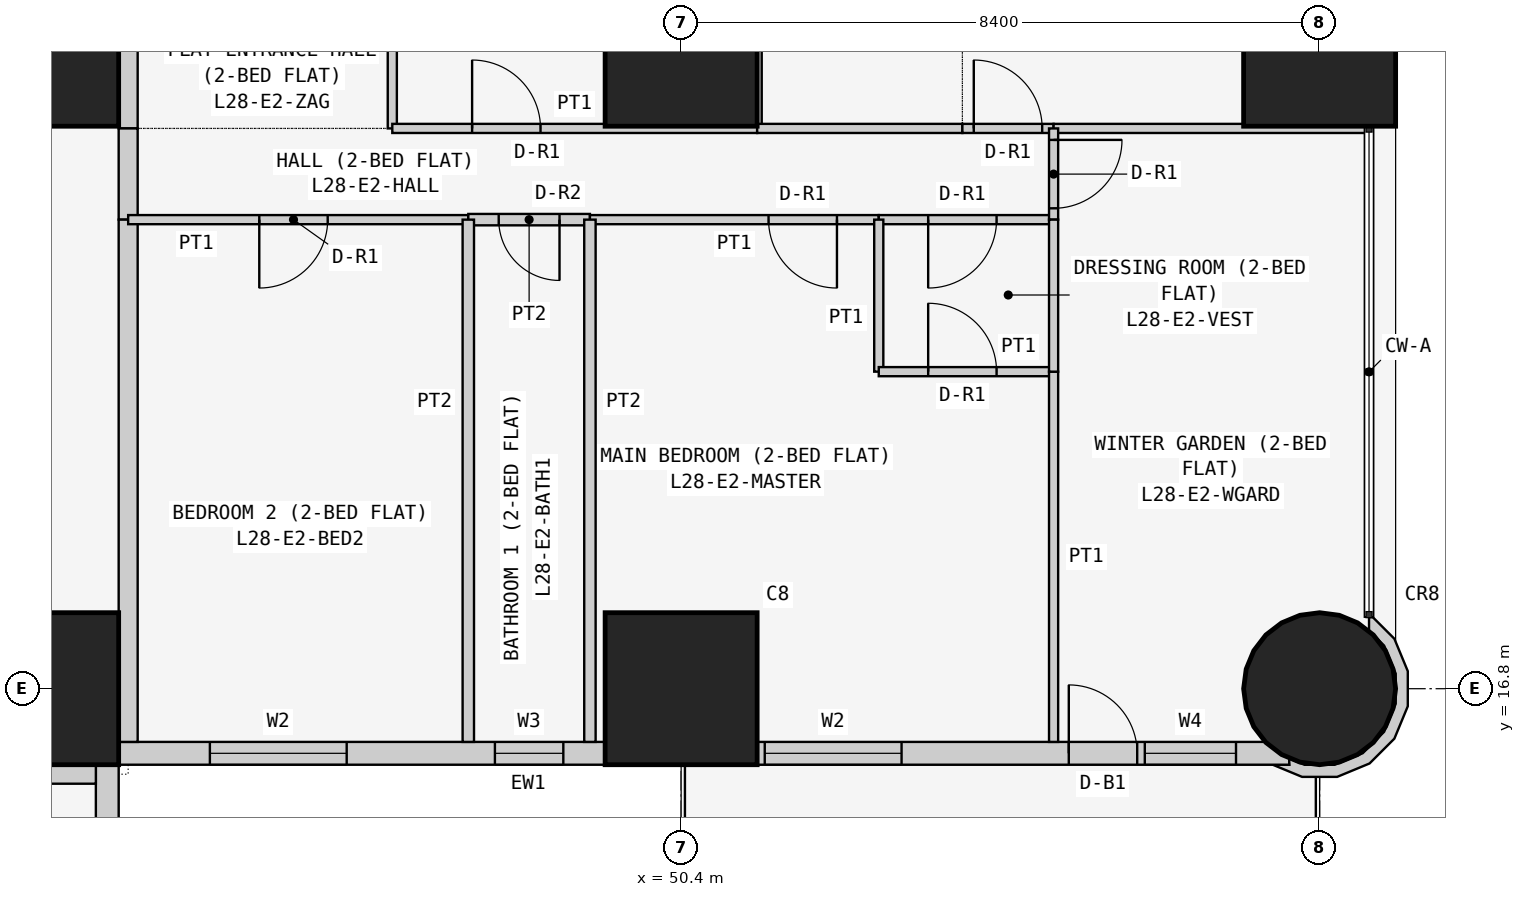
"""IFC4 building model, lengths in metres.
Left out: names, types, materials, properties, quantities, classifications, styles, units other than length and angle.
Written with IfcOpenShell. Run it as: python <this file> out.ifc"""

import sys

from ifc_helpers import new_model, si_unit, direction, frame, frame_2d, origin, origin_2d, place, context, subcontext, project, spatial, polyline, rectangle, circle, outline, extrude, element, fill, save


model = new_model("IFC4")
c1 = context("Model", 3, precision=1e-05, world=origin(), true_north=direction((0.0, 1.0)))
c2 = subcontext(c1, "Body", "Model", "MODEL_VIEW")
j1 = project(units=[si_unit("LENGTHUNIT", "METRE"), si_unit("PLANEANGLEUNIT", "RADIAN")], contexts=[c1])
p1 = place(None, origin())
s1 = spatial("IfcSite", under=j1, at=p1, CompositionType="ELEMENT")
p2 = place(p1, origin())
s2 = spatial("IfcBuilding", under=s1, at=p2, CompositionType="ELEMENT")
p3 = place(p2, frame((0.0, 0.0, 112.5)))
s3 = spatial("IfcBuildingStorey", under=s2, at=p3, CompositionType="ELEMENT", Elevation=112.5)
for number, where, z_axis, x_axis in (
    (1, (42.0, 16.8, 0.0), (0.0, 0.0, 1.0), (1.0, 0.0, 0.0)),
    (2, (42.0, 25.2, 0.0), (0.0, 0.0, 1.0), (1.0, 0.0, 0.0)),
    (3, (50.4, 16.8, 0.0), (0.0, 0.0, 1.0), (1.0, 0.0, 0.0)),
    (4, (50.4, 25.2, 0.0), (0.0, 0.0, 1.0), (1.0, 0.0, 0.0)),
):
    element("IfcColumn", number, at=place(p3, frame(where, z_axis=z_axis, x_axis=x_axis)), inside=s3, PredefinedType="COLUMN", context=c2, shape_type="SweptSolid", body=[
        extrude(rectangle(XDim=2.0, YDim=2.0, at=origin_2d()), origin(), (0.0, 0.0, 1.0), 3.6),
    ])
p4 = place(p3, frame((58.8, 16.8, 0.0), z_axis=(0.0, 0.0, 1.0), x_axis=(1.0, 0.0, 0.0)))
e5 = element("IfcColumn", 5, at=p4, inside=s3, PredefinedType="COLUMN", context=c2, shape_type="SweptSolid", body=[
    extrude(circle(Radius=1.0, at=origin_2d()), origin(), (0.0, 0.0, 1.0), 3.6),
])
p5 = place(p3, frame((58.8, 25.2, 0.0), z_axis=(0.0, 0.0, 1.0), x_axis=(1.0, 0.0, 0.0)))
e6 = element("IfcColumn", 6, at=p5, inside=s3, PredefinedType="COLUMN", context=c2, shape_type="SweptSolid", body=[
    extrude(rectangle(XDim=2.0, YDim=2.0, at=origin_2d()), origin(), (0.0, 0.0, 1.0), 3.6),
])
p6 = place(p3, frame((42.85, 8.8, 0.0), z_axis=(0.0, 0.0, 1.0), x_axis=(0.0, 1.0, 0.0)))
e7 = element("IfcWall", 7, at=p6, inside=s3, PredefinedType="SOLIDWALL", context=c2, shape_type="SweptSolid", body=[
    extrude(rectangle(XDim=7.3, YDim=0.3, at=frame_2d((3.65, 0.0))), origin(), (0.0, 0.0, 1.0), 3.45),
])
p7 = place(p6, frame((3.1, 0.0, 0.9)))
e8 = element("IfcOpeningElement", 8, at=p7, cuts=e7, PredefinedType="OPENING", context=c2, shape_type="SweptSolid", body=[
    extrude(rectangle(XDim=2.4, YDim=1.5, at=frame_2d((1.2, 0.75))), frame((0.0, 0.16, 0.0), z_axis=(0.0, -1.0, 0.0), x_axis=(1.0, 0.0, 0.0)), (0.0, 0.0, 1.0), 0.32),
])
p8 = place(p6, frame((0.75, 0.0, 0.9)))
e9 = element("IfcOpeningElement", 9, at=p8, cuts=e7, PredefinedType="OPENING", context=c2, shape_type="SweptSolid", body=[
    extrude(rectangle(XDim=1.2, YDim=1.5, at=frame_2d((0.6, 0.75))), frame((0.0, 0.16, 0.0), z_axis=(0.0, -1.0, 0.0), x_axis=(1.0, 0.0, 0.0)), (0.0, 0.0, 1.0), 0.32),
])
p9 = place(p3, frame((43.0, 15.95, 0.0), z_axis=(0.0, 0.0, 1.0), x_axis=(1.0, 0.0, 0.0)))
e10 = element("IfcWall", 10, at=p9, inside=s3, PredefinedType="SOLIDWALL", context=c2, shape_type="SweptSolid", body=[
    extrude(rectangle(XDim=15.4, YDim=0.3, at=frame_2d((7.7, 0.0))), origin(), (0.0, 0.0, 1.0), 3.45),
])
p10 = place(p9, frame((1.2, 0.0, 0.9)))
e11 = element("IfcOpeningElement", 11, at=p10, cuts=e10, PredefinedType="OPENING", context=c2, shape_type="SweptSolid", body=[
    extrude(rectangle(XDim=1.8, YDim=1.5, at=frame_2d((0.9, 0.75))), frame((0.0, 0.16, 0.0), z_axis=(0.0, -1.0, 0.0), x_axis=(1.0, 0.0, 0.0)), (0.0, 0.0, 1.0), 0.32),
])
p11 = place(p9, frame((4.95, 0.0, 1.5)))
e12 = element("IfcOpeningElement", 12, at=p11, cuts=e10, PredefinedType="OPENING", context=c2, shape_type="SweptSolid", body=[
    extrude(rectangle(XDim=0.9, YDim=0.7, at=frame_2d((0.45, 0.35))), frame((0.0, 0.16, 0.0), z_axis=(0.0, -1.0, 0.0), x_axis=(1.0, 0.0, 0.0)), (0.0, 0.0, 1.0), 0.32),
])
p12 = place(p9, frame((8.5, 0.0, 0.9)))
e13 = element("IfcOpeningElement", 13, at=p12, cuts=e10, PredefinedType="OPENING", context=c2, shape_type="SweptSolid", body=[
    extrude(rectangle(XDim=1.8, YDim=1.5, at=frame_2d((0.9, 0.75))), frame((0.0, 0.16, 0.0), z_axis=(0.0, -1.0, 0.0), x_axis=(1.0, 0.0, 0.0)), (0.0, 0.0, 1.0), 0.32),
])
p13 = place(p9, frame((12.5, 0.0, 0.0)))
e14 = element("IfcOpeningElement", 14, at=p13, cuts=e10, PredefinedType="OPENING", context=c2, shape_type="SweptSolid", body=[
    extrude(rectangle(XDim=0.9, YDim=2.4, at=frame_2d((0.45, 1.2))), frame((0.0, 0.16, 0.0), z_axis=(0.0, -1.0, 0.0), x_axis=(1.0, 0.0, 0.0)), (0.0, 0.0, 1.0), 0.32),
])
p14 = place(p9, frame((13.5, 0.0, 0.9)))
e15 = element("IfcOpeningElement", 15, at=p14, cuts=e10, PredefinedType="OPENING", context=c2, shape_type="SweptSolid", body=[
    extrude(rectangle(XDim=1.2, YDim=1.5, at=frame_2d((0.6, 0.75))), frame((0.0, 0.16, 0.0), z_axis=(0.0, -1.0, 0.0), x_axis=(1.0, 0.0, 0.0)), (0.0, 0.0, 1.0), 0.32),
])
p15 = place(p3, frame((58.233, 15.881, 0.0), z_axis=(0.0, 0.0, 1.0), x_axis=(0.831199417842, -0.555974394895, 0.0)))
e16 = element("IfcWall", 16, at=p15, inside=s3, PredefinedType="SOLIDWALL", context=c2, shape_type="SweptSolid", body=[
    extrude(outline(polyline([(0.075, 2.077), (0.351, 2.022), (0.682, 1.801), (0.903, 1.47), (0.981, 1.08), (0.903, 0.689), (0.682, 0.358), (0.351, 0.137), (0.126, 0.092), (0.184, 0.026), (0.004, -0.095), (0.414, -0.013), (0.797, 0.243), (1.053, 0.627), (1.143, 1.08), (1.053, 1.532), (0.796, 1.916), (0.413, 2.172), (0.017, 2.251), (-0.023, 2.224), (0.075, 2.077)])), origin(), (0.0, 0.0, 1.0), 3.45),
])
p16 = place(p3, frame((43.125, 29.4, 0.0), z_axis=(0.0, 0.0, 1.0), x_axis=(0.0, -1.0, 0.0)))
e17 = element("IfcWall", 17, at=p16, inside=s3, PredefinedType="PARTITIONING", context=c2, shape_type="SweptSolid", body=[
    extrude(rectangle(XDim=5.229, YDim=0.25, at=frame_2d((2.615, 0.0))), origin(), (0.0, 0.0, 1.0), 3.45),
])
p17 = place(p16, frame((2.05, 0.0, 0.0)))
e18 = element("IfcOpeningElement", 18, at=p17, cuts=e17, PredefinedType="OPENING", context=c2, shape_type="SweptSolid", body=[
    extrude(rectangle(XDim=1.0, YDim=2.1, at=frame_2d((0.5, 1.05))), frame((0.0, 0.135, 0.0), z_axis=(0.0, -1.0, 0.0), x_axis=(1.0, 0.0, 0.0)), (0.0, 0.0, 1.0), 0.27),
])
p18 = place(p3, frame((43.125, 24.171, 0.0), z_axis=(0.0, 0.0, 1.0), x_axis=(0.0, -1.0, 0.0)))
e19 = element("IfcWall", 19, at=p18, inside=s3, PredefinedType="PARTITIONING", context=c2, shape_type="SweptSolid", body=[
    extrude(rectangle(XDim=1.2, YDim=0.25, at=frame_2d((0.6, 0.0))), origin(), (0.0, 0.0, 1.0), 3.45),
])
p19 = place(p3, frame((43.125, 22.971, 0.0), z_axis=(0.0, 0.0, 1.0), x_axis=(0.0, -1.0, 0.0)))
e20 = element("IfcWall", 20, at=p19, inside=s3, PredefinedType="PARTITIONING", context=c2, shape_type="SweptSolid", body=[
    extrude(rectangle(XDim=6.871, YDim=0.25, at=frame_2d((3.436, 0.0))), origin(), (0.0, 0.0, 1.0), 3.45),
])
p20 = place(p3, frame((42.7, 15.675, 0.0), z_axis=(0.0, 0.0, 1.0), x_axis=(-1.0, 0.0, 0.0)))
e21 = element("IfcWall", 21, at=p20, inside=s3, PredefinedType="PARTITIONING", context=c2, shape_type="SweptSolid", body=[
    extrude(rectangle(XDim=6.471, YDim=0.25, at=frame_2d((3.235, 0.0))), origin(), (0.0, 0.0, 1.0), 3.45),
])
for number, where, z_axis, x_axis in (
    (22, (46.6, 29.4, 0.0), (0.0, 0.0, 1.0), (0.0, -1.0, 0.0)),
    (23, (51.4, 29.4, 0.0), (0.0, 0.0, 1.0), (0.0, -1.0, 0.0)),
):
    element("IfcWall", number, at=place(p3, frame(where, z_axis=z_axis, x_axis=x_axis)), inside=s3, PredefinedType="PARTITIONING", context=c2, shape_type="SweptSolid", body=[
        extrude(rectangle(XDim=5.229, YDim=0.12, at=frame_2d((2.615, 0.0))), origin(), (0.0, 0.0, 1.0), 3.45),
    ])
p21 = place(p3, frame((51.4, 24.171, 0.0), z_axis=(0.0, 0.0, 1.0), x_axis=(-1.0, 0.0, 0.0)))
e24 = element("IfcWall", 24, at=p21, inside=s3, PredefinedType="PARTITIONING", context=c2, shape_type="SweptSolid", body=[
    extrude(rectangle(XDim=4.8, YDim=0.12, at=frame_2d((2.4, 0.0))), origin(), (0.0, 0.0, 1.0), 3.45),
])
p22 = place(p21, frame((2.85, 0.0, 0.0)))
e25 = element("IfcOpeningElement", 25, at=p22, cuts=e24, PredefinedType="OPENING", context=c2, shape_type="SweptSolid", body=[
    extrude(rectangle(XDim=0.9, YDim=2.1, at=frame_2d((0.45, 1.05))), frame((0.0, 0.07, 0.0), z_axis=(0.0, -1.0, 0.0), x_axis=(1.0, 0.0, 0.0)), (0.0, 0.0, 1.0), 0.14),
])
p23 = place(p3, frame((54.1, 24.171, 0.0), z_axis=(0.0, 0.0, 1.0), x_axis=(-1.0, 0.0, 0.0)))
e26 = element("IfcWall", 26, at=p23, inside=s3, PredefinedType="PARTITIONING", context=c2, shape_type="SweptSolid", body=[
    extrude(rectangle(XDim=2.7, YDim=0.12, at=frame_2d((1.35, 0.0))), origin(), (0.0, 0.0, 1.0), 3.45),
])
p24 = place(p3, frame((55.3, 24.171, 0.0), z_axis=(0.0, 0.0, 1.0), x_axis=(-1.0, 0.0, 0.0)))
e27 = element("IfcWall", 27, at=p24, inside=s3, PredefinedType="PARTITIONING", context=c2, shape_type="SweptSolid", body=[
    extrude(rectangle(XDim=1.2, YDim=0.12, at=frame_2d((0.6, 0.0))), origin(), (0.0, 0.0, 1.0), 3.45),
])
p25 = place(p24, frame((0.15, 0.0, 0.0)))
e28 = element("IfcOpeningElement", 28, at=p25, cuts=e27, PredefinedType="OPENING", context=c2, shape_type="SweptSolid", body=[
    extrude(rectangle(XDim=0.9, YDim=2.1, at=frame_2d((0.45, 1.05))), frame((0.0, 0.07, 0.0), z_axis=(0.0, -1.0, 0.0), x_axis=(1.0, 0.0, 0.0)), (0.0, 0.0, 1.0), 0.14),
])
p26 = place(p3, frame((59.45, 24.171, 0.0), z_axis=(0.0, 0.0, 1.0), x_axis=(-1.0, 0.0, 0.0)))
e29 = element("IfcWall", 29, at=p26, inside=s3, PredefinedType="PARTITIONING", context=c2, shape_type="SweptSolid", body=[
    extrude(rectangle(XDim=4.15, YDim=0.12, at=frame_2d((2.075, 0.0))), origin(), (0.0, 0.0, 1.0), 3.45),
])
p27 = place(p3, frame((47.6, 22.971, 0.0), z_axis=(0.0, 0.0, 1.0), x_axis=(-1.0, 0.0, 0.0)))
e30 = element("IfcWall", 30, at=p27, inside=s3, PredefinedType="PARTITIONING", context=c2, shape_type="SweptSolid", body=[
    extrude(rectangle(XDim=4.475, YDim=0.12, at=frame_2d((2.238, 0.0))), origin(), (0.0, 0.0, 1.0), 3.45),
])
p28 = place(p27, frame((1.85, 0.0, 0.0)))
e31 = element("IfcOpeningElement", 31, at=p28, cuts=e30, PredefinedType="OPENING", context=c2, shape_type="SweptSolid", body=[
    extrude(rectangle(XDim=0.9, YDim=2.1, at=frame_2d((0.45, 1.05))), frame((0.0, 0.07, 0.0), z_axis=(0.0, -1.0, 0.0), x_axis=(1.0, 0.0, 0.0)), (0.0, 0.0, 1.0), 0.14),
])
p29 = place(p3, frame((49.2, 22.971, 0.0), z_axis=(0.0, 0.0, 1.0), x_axis=(-1.0, 0.0, 0.0)))
e32 = element("IfcWall", 32, at=p29, inside=s3, PredefinedType="PARTITIONING", context=c2, shape_type="SweptSolid", body=[
    extrude(rectangle(XDim=1.6, YDim=0.15, at=frame_2d((0.8, 0.0))), origin(), (0.0, 0.0, 1.0), 3.45),
])
p30 = place(p29, frame((0.4, 0.0, 0.0)))
e33 = element("IfcOpeningElement", 33, at=p30, cuts=e32, PredefinedType="OPENING", context=c2, shape_type="SweptSolid", body=[
    extrude(rectangle(XDim=0.8, YDim=2.1, at=frame_2d((0.4, 1.05))), frame((0.0, 0.085, 0.0), z_axis=(0.0, -1.0, 0.0), x_axis=(1.0, 0.0, 0.0)), (0.0, 0.0, 1.0), 0.17),
])
p31 = place(p3, frame((53.0, 22.971, 0.0), z_axis=(0.0, 0.0, 1.0), x_axis=(-1.0, 0.0, 0.0)))
e34 = element("IfcWall", 34, at=p31, inside=s3, PredefinedType="PARTITIONING", context=c2, shape_type="SweptSolid", body=[
    extrude(rectangle(XDim=3.8, YDim=0.12, at=frame_2d((1.9, 0.0))), origin(), (0.0, 0.0, 1.0), 3.45),
])
p32 = place(p31, frame((0.55, 0.0, 0.0)))
e35 = element("IfcOpeningElement", 35, at=p32, cuts=e34, PredefinedType="OPENING", context=c2, shape_type="SweptSolid", body=[
    extrude(rectangle(XDim=0.9, YDim=2.1, at=frame_2d((0.45, 1.05))), frame((0.0, 0.07, 0.0), z_axis=(0.0, -1.0, 0.0), x_axis=(1.0, 0.0, 0.0)), (0.0, 0.0, 1.0), 0.14),
])
p33 = place(p3, frame((55.3, 22.971, 0.0), z_axis=(0.0, 0.0, 1.0), x_axis=(-1.0, 0.0, 0.0)))
e36 = element("IfcWall", 36, at=p33, inside=s3, PredefinedType="PARTITIONING", context=c2, shape_type="SweptSolid", body=[
    extrude(rectangle(XDim=2.3, YDim=0.12, at=frame_2d((1.15, 0.0))), origin(), (0.0, 0.0, 1.0), 3.45),
])
p34 = place(p33, frame((0.75, 0.0, 0.0)))
e37 = element("IfcOpeningElement", 37, at=p34, cuts=e36, PredefinedType="OPENING", context=c2, shape_type="SweptSolid", body=[
    extrude(rectangle(XDim=0.9, YDim=2.1, at=frame_2d((0.45, 1.05))), frame((0.0, 0.07, 0.0), z_axis=(0.0, -1.0, 0.0), x_axis=(1.0, 0.0, 0.0)), (0.0, 0.0, 1.0), 0.14),
])
p35 = place(p3, frame((55.3, 24.171, 0.0), z_axis=(0.0, 0.0, 1.0), x_axis=(0.0, -1.0, 0.0)))
e38 = element("IfcWall", 38, at=p35, inside=s3, PredefinedType="PARTITIONING", context=c2, shape_type="SweptSolid", body=[
    extrude(rectangle(XDim=1.2, YDim=0.12, at=frame_2d((0.6, 0.0))), origin(), (0.0, 0.0, 1.0), 3.45),
])
p36 = place(p35, frame((0.151, 0.0, 0.0)))
e39 = element("IfcOpeningElement", 39, at=p36, cuts=e38, PredefinedType="OPENING", context=c2, shape_type="SweptSolid", body=[
    extrude(rectangle(XDim=0.9, YDim=2.1, at=frame_2d((0.45, 1.05))), frame((0.0, 0.07, 0.0), z_axis=(0.0, -1.0, 0.0), x_axis=(1.0, 0.0, 0.0)), (0.0, 0.0, 1.0), 0.14),
])
for number, where, z_axis, x_axis in (
    (40, (47.6, 22.971, 0.0), (0.0, 0.0, 1.0), (0.0, -1.0, 0.0)),
    (41, (49.2, 22.971, 0.0), (0.0, 0.0, 1.0), (0.0, -1.0, 0.0)),
):
    element("IfcWall", number, at=place(p3, frame(where, z_axis=z_axis, x_axis=x_axis)), inside=s3, PredefinedType="PARTITIONING", context=c2, shape_type="SweptSolid", body=[
        extrude(rectangle(XDim=6.871, YDim=0.15, at=frame_2d((3.436, 0.0))), origin(), (0.0, 0.0, 1.0), 3.45),
    ])
p37 = place(p3, frame((53.0, 22.971, 0.0), z_axis=(0.0, 0.0, 1.0), x_axis=(0.0, -1.0, 0.0)))
e42 = element("IfcWall", 42, at=p37, inside=s3, PredefinedType="PARTITIONING", context=c2, shape_type="SweptSolid", body=[
    extrude(rectangle(XDim=2.0, YDim=0.12, at=frame_2d((1.0, 0.0))), origin(), (0.0, 0.0, 1.0), 3.45),
])
p38 = place(p3, frame((53.0, 20.971, 0.0), z_axis=(0.0, 0.0, 1.0), x_axis=(1.0, 0.0, 0.0)))
e43 = element("IfcWall", 43, at=p38, inside=s3, PredefinedType="PARTITIONING", context=c2, shape_type="SweptSolid", body=[
    extrude(rectangle(XDim=2.3, YDim=0.12, at=frame_2d((1.15, 0.0))), origin(), (0.0, 0.0, 1.0), 3.45),
])
p39 = place(p38, frame((0.65, 0.0, 0.0)))
e44 = element("IfcOpeningElement", 44, at=p39, cuts=e43, PredefinedType="OPENING", context=c2, shape_type="SweptSolid", body=[
    extrude(rectangle(XDim=0.9, YDim=2.1, at=frame_2d((0.45, 1.05))), frame((0.0, 0.07, 0.0), z_axis=(0.0, -1.0, 0.0), x_axis=(1.0, 0.0, 0.0)), (0.0, 0.0, 1.0), 0.14),
])
p40 = place(p3, frame((55.3, 20.971, 0.0), z_axis=(0.0, 0.0, 1.0), x_axis=(0.0, -1.0, 0.0)))
e45 = element("IfcWall", 45, at=p40, inside=s3, PredefinedType="PARTITIONING", context=c2, shape_type="SweptSolid", body=[
    extrude(rectangle(XDim=4.871, YDim=0.12, at=frame_2d((2.436, 0.0))), origin(), (0.0, 0.0, 1.0), 3.45),
])
p41 = place(p3, frame((55.3, 22.971, 0.0), z_axis=(0.0, 0.0, 1.0), x_axis=(0.0, -1.0, 0.0)))
e46 = element("IfcWall", 46, at=p41, inside=s3, PredefinedType="PARTITIONING", context=c2, shape_type="SweptSolid", body=[
    extrude(rectangle(XDim=2.0, YDim=0.12, at=frame_2d((1.0, 0.0))), origin(), (0.0, 0.0, 1.0), 3.45),
])
p42 = place(p10, origin())
e47 = element("IfcWindow", 47, at=p42, inside=s3, PartitioningType="SINGLE_PANEL", PredefinedType="WINDOW", context=c2, shape_type="SweptSolid", body=[
    extrude(rectangle(XDim=1.8, YDim=1.5, at=frame_2d((0.9, 0.75))), frame((0.0, 0.03, 0.0), z_axis=(0.0, -1.0, 0.0), x_axis=(1.0, 0.0, 0.0)), (0.0, 0.0, 1.0), 0.06),
])
fill(e11, e47)
p43 = place(p11, origin())
e48 = element("IfcWindow", 48, at=p43, inside=s3, PartitioningType="SINGLE_PANEL", PredefinedType="WINDOW", context=c2, shape_type="SweptSolid", body=[
    extrude(rectangle(XDim=0.9, YDim=0.7, at=frame_2d((0.45, 0.35))), frame((0.0, 0.03, 0.0), z_axis=(0.0, -1.0, 0.0), x_axis=(1.0, 0.0, 0.0)), (0.0, 0.0, 1.0), 0.06),
])
fill(e12, e48)
p44 = place(p12, origin())
e49 = element("IfcWindow", 49, at=p44, inside=s3, PartitioningType="SINGLE_PANEL", PredefinedType="WINDOW", context=c2, shape_type="SweptSolid", body=[
    extrude(rectangle(XDim=1.8, YDim=1.5, at=frame_2d((0.9, 0.75))), frame((0.0, 0.03, 0.0), z_axis=(0.0, -1.0, 0.0), x_axis=(1.0, 0.0, 0.0)), (0.0, 0.0, 1.0), 0.06),
])
fill(e13, e49)
p45 = place(p13, origin())
e50 = element("IfcDoor", 50, at=p45, inside=s3, OperationType="SINGLE_SWING_LEFT", PredefinedType="DOOR", context=c2, shape_type="SweptSolid", body=[
    extrude(rectangle(XDim=0.9, YDim=2.4, at=frame_2d((0.45, 1.2))), frame((0.0, 0.025, 0.0), z_axis=(0.0, -1.0, 0.0), x_axis=(1.0, 0.0, 0.0)), (0.0, 0.0, 1.0), 0.05),
])
fill(e14, e50)
p46 = place(p14, origin())
e51 = element("IfcWindow", 51, at=p46, inside=s3, PartitioningType="SINGLE_PANEL", PredefinedType="WINDOW", context=c2, shape_type="SweptSolid", body=[
    extrude(rectangle(XDim=1.2, YDim=1.5, at=frame_2d((0.6, 0.75))), frame((0.0, 0.03, 0.0), z_axis=(0.0, -1.0, 0.0), x_axis=(1.0, 0.0, 0.0)), (0.0, 0.0, 1.0), 0.06),
])
fill(e15, e51)
p47 = place(p22, frame((0.9, 0.0, 0.0), z_axis=(0.0, 0.0, 1.0), x_axis=(-1.0, 0.0, 0.0)))
e52 = element("IfcDoor", 52, at=p47, inside=s3, OperationType="SINGLE_SWING_LEFT", PredefinedType="DOOR", context=c2, shape_type="SweptSolid", body=[
    extrude(rectangle(XDim=0.9, YDim=2.1, at=frame_2d((0.45, 1.05))), frame((0.0, 0.025, 0.0), z_axis=(0.0, -1.0, 0.0), x_axis=(1.0, 0.0, 0.0)), (0.0, 0.0, 1.0), 0.05),
])
fill(e25, e52)
p48 = place(p25, frame((0.9, 0.0, 0.0), z_axis=(0.0, 0.0, 1.0), x_axis=(-1.0, 0.0, 0.0)))
e53 = element("IfcDoor", 53, at=p48, inside=s3, OperationType="SINGLE_SWING_LEFT", PredefinedType="DOOR", context=c2, shape_type="SweptSolid", body=[
    extrude(rectangle(XDim=0.9, YDim=2.1, at=frame_2d((0.45, 1.05))), frame((0.0, 0.025, 0.0), z_axis=(0.0, -1.0, 0.0), x_axis=(1.0, 0.0, 0.0)), (0.0, 0.0, 1.0), 0.05),
])
fill(e28, e53)
p49 = place(p28, origin())
e54 = element("IfcDoor", 54, at=p49, inside=s3, OperationType="SINGLE_SWING_RIGHT", PredefinedType="DOOR", context=c2, shape_type="SweptSolid", body=[
    extrude(rectangle(XDim=0.9, YDim=2.1, at=frame_2d((0.45, 1.05))), frame((0.0, 0.025, 0.0), z_axis=(0.0, -1.0, 0.0), x_axis=(1.0, 0.0, 0.0)), (0.0, 0.0, 1.0), 0.05),
])
fill(e31, e54)
p50 = place(p30, origin())
e55 = element("IfcDoor", 55, at=p50, inside=s3, OperationType="SINGLE_SWING_LEFT", PredefinedType="DOOR", context=c2, shape_type="SweptSolid", body=[
    extrude(rectangle(XDim=0.8, YDim=2.1, at=frame_2d((0.4, 1.05))), frame((0.0, 0.025, 0.0), z_axis=(0.0, -1.0, 0.0), x_axis=(1.0, 0.0, 0.0)), (0.0, 0.0, 1.0), 0.05),
])
fill(e33, e55)
p51 = place(p32, origin())
e56 = element("IfcDoor", 56, at=p51, inside=s3, OperationType="SINGLE_SWING_LEFT", PredefinedType="DOOR", context=c2, shape_type="SweptSolid", body=[
    extrude(rectangle(XDim=0.9, YDim=2.1, at=frame_2d((0.45, 1.05))), frame((0.0, 0.025, 0.0), z_axis=(0.0, -1.0, 0.0), x_axis=(1.0, 0.0, 0.0)), (0.0, 0.0, 1.0), 0.05),
])
fill(e35, e56)
p52 = place(p34, origin())
e57 = element("IfcDoor", 57, at=p52, inside=s3, OperationType="SINGLE_SWING_RIGHT", PredefinedType="DOOR", context=c2, shape_type="SweptSolid", body=[
    extrude(rectangle(XDim=0.9, YDim=2.1, at=frame_2d((0.45, 1.05))), frame((0.0, 0.025, 0.0), z_axis=(0.0, -1.0, 0.0), x_axis=(1.0, 0.0, 0.0)), (0.0, 0.0, 1.0), 0.05),
])
fill(e37, e57)
p53 = place(p39, origin())
e58 = element("IfcDoor", 58, at=p53, inside=s3, OperationType="SINGLE_SWING_LEFT", PredefinedType="DOOR", context=c2, shape_type="SweptSolid", body=[
    extrude(rectangle(XDim=0.9, YDim=2.1, at=frame_2d((0.45, 1.05))), frame((0.0, 0.025, 0.0), z_axis=(0.0, -1.0, 0.0), x_axis=(1.0, 0.0, 0.0)), (0.0, 0.0, 1.0), 0.05),
])
fill(e44, e58)
p54 = place(p36, origin())
e59 = element("IfcDoor", 59, at=p54, inside=s3, OperationType="SINGLE_SWING_LEFT", PredefinedType="DOOR", context=c2, shape_type="SweptSolid", body=[
    extrude(rectangle(XDim=0.9, YDim=2.1, at=frame_2d((0.45, 1.05))), frame((0.0, 0.025, 0.0), z_axis=(0.0, -1.0, 0.0), x_axis=(1.0, 0.0, 0.0)), (0.0, 0.0, 1.0), 0.05),
])
fill(e39, e59)
save(model, sys.argv[1])
